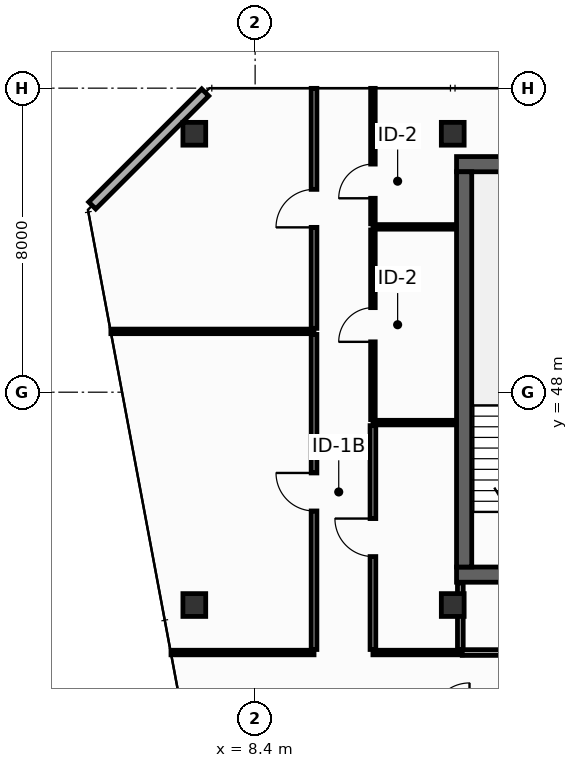
"""IFC4 building model, lengths in metres.
Left out: names, types, materials, properties, quantities, classifications, styles, units other than length and angle.
Written with IfcOpenShell. Run it as: python <this file> out.ifc"""

import sys

from ifc_helpers import new_model, si_unit, direction, frame, frame_2d, origin, origin_2d, place, context, subcontext, project, spatial, rectangle, hollow_rectangle, extrude, element, fill, save


model = new_model("IFC4")
c1 = context("Model", 3, precision=1e-05, world=origin(), true_north=direction((0.0, 1.0)))
c2 = subcontext(c1, "Body", "Model", "MODEL_VIEW")
j1 = project(units=[si_unit("LENGTHUNIT", "METRE"), si_unit("PLANEANGLEUNIT", "RADIAN")], contexts=[c1])
p1 = place(None, origin())
s1 = spatial("IfcSite", under=j1, at=p1, CompositionType="ELEMENT")
p2 = place(p1, origin())
s2 = spatial("IfcBuilding", under=s1, at=p2, CompositionType="ELEMENT")
p3 = place(p2, frame((0.0, 0.0, 287.6)))
s3 = spatial("IfcBuildingStorey", under=s2, at=p3, CompositionType="ELEMENT", Elevation=287.6)
p4 = place(p3, frame((13.7, 43.2, 0.0), z_axis=(0.0, 0.0, 1.0), x_axis=(1.0, 0.0, 0.0)))
e1 = element("IfcWall", 1, at=p4, inside=s3, PredefinedType="SHEAR", context=c2, shape_type="SweptSolid", body=[
    extrude(rectangle(XDim=32.5, YDim=0.4, at=frame_2d((16.25, 0.0))), origin(), (0.0, 0.0, 1.0), 3.55),
])
p5 = place(p4, frame((5.4, 0.0, 0.0)))
e2 = element("IfcOpeningElement", 2, at=p5, cuts=e1, PredefinedType="OPENING", context=c2, shape_type="SweptSolid", body=[
    extrude(rectangle(XDim=1.1, YDim=2.15, at=frame_2d((0.55, 1.075))), frame((0.0, 0.21, 0.0), z_axis=(0.0, -1.0, 0.0), x_axis=(1.0, 0.0, 0.0)), (0.0, 0.0, 1.0), 0.42),
])
p6 = place(p4, frame((25.6, 0.0, 0.0)))
e3 = element("IfcOpeningElement", 3, at=p6, cuts=e1, PredefinedType="OPENING", context=c2, shape_type="SweptSolid", body=[
    extrude(rectangle(XDim=1.1, YDim=2.15, at=frame_2d((0.55, 1.075))), frame((0.0, 0.21, 0.0), z_axis=(0.0, -1.0, 0.0), x_axis=(1.0, 0.0, 0.0)), (0.0, 0.0, 1.0), 0.42),
])
p7 = place(p3, frame((13.7, 54.0, 0.0), z_axis=(0.0, 0.0, 1.0), x_axis=(1.0, 0.0, 0.0)))
e4 = element("IfcWall", 4, at=p7, inside=s3, PredefinedType="SHEAR", context=c2, shape_type="SweptSolid", body=[
    extrude(rectangle(XDim=32.5, YDim=0.4, at=frame_2d((16.25, 0.0))), origin(), (0.0, 0.0, 1.0), 3.55),
])
p8 = place(p3, frame((13.9, 43.4, 0.0), z_axis=(0.0, 0.0, 1.0), x_axis=(0.0, 1.0, 0.0)))
e5 = element("IfcWall", 5, at=p8, inside=s3, PredefinedType="SHEAR", context=c2, shape_type="SweptSolid", body=[
    extrude(rectangle(XDim=10.4, YDim=0.4, at=frame_2d((5.2, 0.0))), origin(), (0.0, 0.0, 1.0), 3.55),
])
for number, where, z_axis, x_axis in (
    (6, (6.8, 54.8, 0.0), (0.0, 0.0, 1.0), (1.0, 0.0, 0.0)),
    (7, (13.6, 54.8, 0.0), (0.0, 0.0, 1.0), (1.0, 0.0, 0.0)),
    (8, (6.8, 42.4, 0.0), (0.0, 0.0, 1.0), (1.0, 0.0, 0.0)),
    (9, (13.6, 42.4, 0.0), (0.0, 0.0, 1.0), (1.0, 0.0, 0.0)),
):
    element("IfcColumn", number, at=place(p3, frame(where, z_axis=z_axis, x_axis=x_axis)), inside=s3, PredefinedType="COLUMN", context=c2, shape_type="SweptSolid", body=[
        extrude(hollow_rectangle(XDim=0.6, YDim=0.6, WallThickness=0.028, at=origin_2d()), origin(), (0.0, 0.0, 1.0), 3.8),
    ])
p9 = place(p3, frame((7.087, 55.887, 0.0), z_axis=(0.0, 0.0, 1.0), x_axis=(-0.707106781187, -0.707106781187, 0.0)))
e10 = element("IfcWall", 10, at=p9, inside=s3, PredefinedType="STANDARD", context=c2, shape_type="SweptSolid", body=[
    extrude(rectangle(XDim=4.206, YDim=0.26, at=frame_2d((2.103, 0.0))), origin(), (0.0, 0.0, 1.0), 3.55),
])
p10 = place(p3, frame((6.186, 41.15, 0.0), z_axis=(0.0, 0.0, 1.0), x_axis=(1.0, 0.0, 0.0)))
e11 = element("IfcWall", 11, at=p10, inside=s3, PredefinedType="PARTITIONING", context=c2, shape_type="SweptSolid", body=[
    extrude(rectangle(XDim=3.764, YDim=0.12, at=frame_2d((1.882, 0.0))), origin(), (0.0, 0.0, 1.0), 3.085),
])
p11 = place(p3, frame((11.5, 41.15, 0.0), z_axis=(0.0, 0.0, 1.0), x_axis=(1.0, 0.0, 0.0)))
e12 = element("IfcWall", 12, at=p11, inside=s3, PredefinedType="PARTITIONING", context=c2, shape_type="SweptSolid", body=[
    extrude(rectangle(XDim=2.35, YDim=0.12, at=frame_2d((1.175, 0.0))), origin(), (0.0, 0.0, 1.0), 3.55),
])
p12 = place(p3, frame((11.5, 52.35, 0.0), z_axis=(0.0, 0.0, 1.0), x_axis=(1.0, 0.0, 0.0)))
e13 = element("IfcWall", 13, at=p12, inside=s3, PredefinedType="PARTITIONING", context=c2, shape_type="SweptSolid", body=[
    extrude(rectangle(XDim=2.18, YDim=0.12, at=frame_2d((1.09, 0.0))), origin(), (0.0, 0.0, 1.0), 3.55),
])
p13 = place(p3, frame((11.5, 52.43, 0.0), z_axis=(0.0, 0.0, 1.0), x_axis=(0.0, 1.0, 0.0)))
e14 = element("IfcWall", 14, at=p13, inside=s3, PredefinedType="PARTITIONING", context=c2, shape_type="SweptSolid", body=[
    extrude(rectangle(XDim=3.565, YDim=0.12, at=frame_2d((1.783, 0.0))), origin(), (0.0, 0.0, 1.0), 2.935),
])
p14 = place(p13, frame((0.672, 0.0, 0.0)))
e15 = element("IfcOpeningElement", 15, at=p14, cuts=e14, PredefinedType="OPENING", context=c2, shape_type="SweptSolid", body=[
    extrude(rectangle(XDim=0.9, YDim=2.1, at=frame_2d((0.45, 1.05))), frame((0.0, 0.07, 0.0), z_axis=(0.0, -1.0, 0.0), x_axis=(1.0, 0.0, 0.0)), (0.0, 0.0, 1.0), 0.14),
])
p15 = place(p3, frame((4.604, 49.6, 0.0), z_axis=(0.0, 0.0, 1.0), x_axis=(1.0, 0.0, 0.0)))
e16 = element("IfcWall", 16, at=p15, inside=s3, PredefinedType="PARTITIONING", context=c2, shape_type="SweptSolid", body=[
    extrude(rectangle(XDim=5.346, YDim=0.12, at=frame_2d((2.673, 0.0))), origin(), (0.0, 0.0, 1.0), 2.947),
])
p16 = place(p3, frame((9.95, 41.23, 0.0), z_axis=(0.0, 0.0, 1.0), x_axis=(0.0, 1.0, 0.0)))
e17 = element("IfcWall", 17, at=p16, inside=s3, PredefinedType="PARTITIONING", context=c2, shape_type="SweptSolid", body=[
    extrude(rectangle(XDim=8.29, YDim=0.15, at=frame_2d((4.145, 0.0))), origin(), (0.0, 0.0, 1.0), 2.947),
])
p17 = place(p16, frame((3.645, 0.0, 0.0)))
e18 = element("IfcOpeningElement", 18, at=p17, cuts=e17, PredefinedType="OPENING", context=c2, shape_type="SweptSolid", body=[
    extrude(rectangle(XDim=1.0, YDim=2.15, at=frame_2d((0.5, 1.075))), frame((0.0, 0.085, 0.0), z_axis=(0.0, -1.0, 0.0), x_axis=(1.0, 0.0, 0.0)), (0.0, 0.0, 1.0), 0.17),
])
p18 = place(p3, frame((9.95, 49.68, 0.0), z_axis=(0.0, 0.0, 1.0), x_axis=(0.0, 1.0, 0.0)))
e19 = element("IfcWall", 19, at=p18, inside=s3, PredefinedType="PARTITIONING", context=c2, shape_type="SweptSolid", body=[
    extrude(rectangle(XDim=6.315, YDim=0.15, at=frame_2d((3.158, 0.0))), origin(), (0.0, 0.0, 1.0), 2.935),
])
p19 = place(p18, frame((2.657, 0.0, 0.0)))
e20 = element("IfcOpeningElement", 20, at=p19, cuts=e19, PredefinedType="OPENING", context=c2, shape_type="SweptSolid", body=[
    extrude(rectangle(XDim=1.0, YDim=2.15, at=frame_2d((0.5, 1.075))), frame((0.0, 0.085, 0.0), z_axis=(0.0, -1.0, 0.0), x_axis=(1.0, 0.0, 0.0)), (0.0, 0.0, 1.0), 0.17),
])
p20 = place(p3, frame((11.5, 47.2, 0.0), z_axis=(0.0, 0.0, 1.0), x_axis=(1.0, 0.0, 0.0)))
e21 = element("IfcWall", 21, at=p20, inside=s3, PredefinedType="PARTITIONING", context=c2, shape_type="SweptSolid", body=[
    extrude(rectangle(XDim=2.18, YDim=0.12, at=frame_2d((1.09, 0.0))), origin(), (0.0, 0.0, 1.0), 3.55),
])
p21 = place(p3, frame((11.5, 41.23, 0.0), z_axis=(0.0, 0.0, 1.0), x_axis=(0.0, 1.0, 0.0)))
e22 = element("IfcWall", 22, at=p21, inside=s3, PredefinedType="PARTITIONING", context=c2, shape_type="SweptSolid", body=[
    extrude(rectangle(XDim=5.89, YDim=0.15, at=frame_2d((2.945, 0.0))), origin(), (0.0, 0.0, 1.0), 2.947),
])
p22 = place(p21, frame((2.445, 0.0, 0.0)))
e23 = element("IfcOpeningElement", 23, at=p22, cuts=e22, PredefinedType="OPENING", context=c2, shape_type="SweptSolid", body=[
    extrude(rectangle(XDim=1.0, YDim=2.15, at=frame_2d((0.5, 1.075))), frame((0.0, 0.085, 0.0), z_axis=(0.0, -1.0, 0.0), x_axis=(1.0, 0.0, 0.0)), (0.0, 0.0, 1.0), 0.17),
])
p23 = place(p3, frame((11.5, 47.28, 0.0), z_axis=(0.0, 0.0, 1.0), x_axis=(0.0, 1.0, 0.0)))
e24 = element("IfcWall", 24, at=p23, inside=s3, PredefinedType="PARTITIONING", context=c2, shape_type="SweptSolid", body=[
    extrude(rectangle(XDim=4.99, YDim=0.12, at=frame_2d((2.495, 0.0))), origin(), (0.0, 0.0, 1.0), 3.55),
])
p24 = place(p23, frame((2.045, 0.0, 0.0)))
e25 = element("IfcOpeningElement", 25, at=p24, cuts=e24, PredefinedType="OPENING", context=c2, shape_type="SweptSolid", body=[
    extrude(rectangle(XDim=0.9, YDim=2.1, at=frame_2d((0.45, 1.05))), frame((0.0, 0.07, 0.0), z_axis=(0.0, -1.0, 0.0), x_axis=(1.0, 0.0, 0.0)), (0.0, 0.0, 1.0), 0.14),
])
p25 = place(p3, frame((13.8, 41.23, 0.0), z_axis=(0.0, 0.0, 1.0), x_axis=(0.0, 1.0, 0.0)))
e26 = element("IfcWall", 26, at=p25, inside=s3, PredefinedType="PARTITIONING", context=c2, shape_type="SweptSolid", body=[
    extrude(rectangle(XDim=1.75, YDim=0.15, at=frame_2d((0.875, 0.0))), origin(), (0.0, 0.0, 1.0), 3.55),
])
p26 = place(p3, frame((13.85, 41.15, 0.0), z_axis=(0.0, 0.0, 1.0), x_axis=(1.0, 0.0, 0.0)))
e27 = element("IfcWall", 27, at=p26, inside=s3, PredefinedType="PARTITIONING", context=c2, shape_type="SweptSolid", body=[
    extrude(rectangle(XDim=4.655, YDim=0.15, at=frame_2d((2.327, 0.0))), origin(), (0.0, 0.0, 1.0), 3.55),
])
p27 = place(p26, frame((1.827, 0.0, 0.0)))
e28 = element("IfcOpeningElement", 28, at=p27, cuts=e27, PredefinedType="OPENING", context=c2, shape_type="SweptSolid", body=[
    extrude(rectangle(XDim=1.0, YDim=2.15, at=frame_2d((0.5, 1.075))), frame((0.0, 0.085, 0.0), z_axis=(0.0, -1.0, 0.0), x_axis=(1.0, 0.0, 0.0)), (0.0, 0.0, 1.0), 0.17),
])
p28 = place(p14, origin())
e29 = element("IfcDoor", 29, at=p28, inside=s3, OperationType="SINGLE_SWING_LEFT", PredefinedType="DOOR", context=c2, shape_type="SweptSolid", body=[
    extrude(rectangle(XDim=0.9, YDim=2.1, at=frame_2d((0.45, 1.05))), frame((0.0, 0.025, 0.0), z_axis=(0.0, -1.0, 0.0), x_axis=(1.0, 0.0, 0.0)), (0.0, 0.0, 1.0), 0.05),
])
fill(e15, e29)
p29 = place(p17, origin())
e30 = element("IfcDoor", 30, at=p29, inside=s3, OperationType="SINGLE_SWING_RIGHT", PredefinedType="DOOR", context=c2, shape_type="SweptSolid", body=[
    extrude(rectangle(XDim=1.0, YDim=2.15, at=frame_2d((0.5, 1.075))), frame((0.0, 0.025, 0.0), z_axis=(0.0, -1.0, 0.0), x_axis=(1.0, 0.0, 0.0)), (0.0, 0.0, 1.0), 0.05),
])
fill(e18, e30)
p30 = place(p19, origin())
e31 = element("IfcDoor", 31, at=p30, inside=s3, OperationType="SINGLE_SWING_LEFT", PredefinedType="DOOR", context=c2, shape_type="SweptSolid", body=[
    extrude(rectangle(XDim=1.0, YDim=2.15, at=frame_2d((0.5, 1.075))), frame((0.0, 0.025, 0.0), z_axis=(0.0, -1.0, 0.0), x_axis=(1.0, 0.0, 0.0)), (0.0, 0.0, 1.0), 0.05),
])
fill(e20, e31)
p31 = place(p22, origin())
e32 = element("IfcDoor", 32, at=p31, inside=s3, OperationType="SINGLE_SWING_RIGHT", PredefinedType="DOOR", context=c2, shape_type="SweptSolid", body=[
    extrude(rectangle(XDim=1.0, YDim=2.15, at=frame_2d((0.5, 1.075))), frame((0.0, 0.025, 0.0), z_axis=(0.0, -1.0, 0.0), x_axis=(1.0, 0.0, 0.0)), (0.0, 0.0, 1.0), 0.05),
])
fill(e23, e32)
p32 = place(p24, origin())
e33 = element("IfcDoor", 33, at=p32, inside=s3, OperationType="SINGLE_SWING_LEFT", PredefinedType="DOOR", context=c2, shape_type="SweptSolid", body=[
    extrude(rectangle(XDim=0.9, YDim=2.1, at=frame_2d((0.45, 1.05))), frame((0.0, 0.025, 0.0), z_axis=(0.0, -1.0, 0.0), x_axis=(1.0, 0.0, 0.0)), (0.0, 0.0, 1.0), 0.05),
])
fill(e25, e33)
save(model, sys.argv[1])
